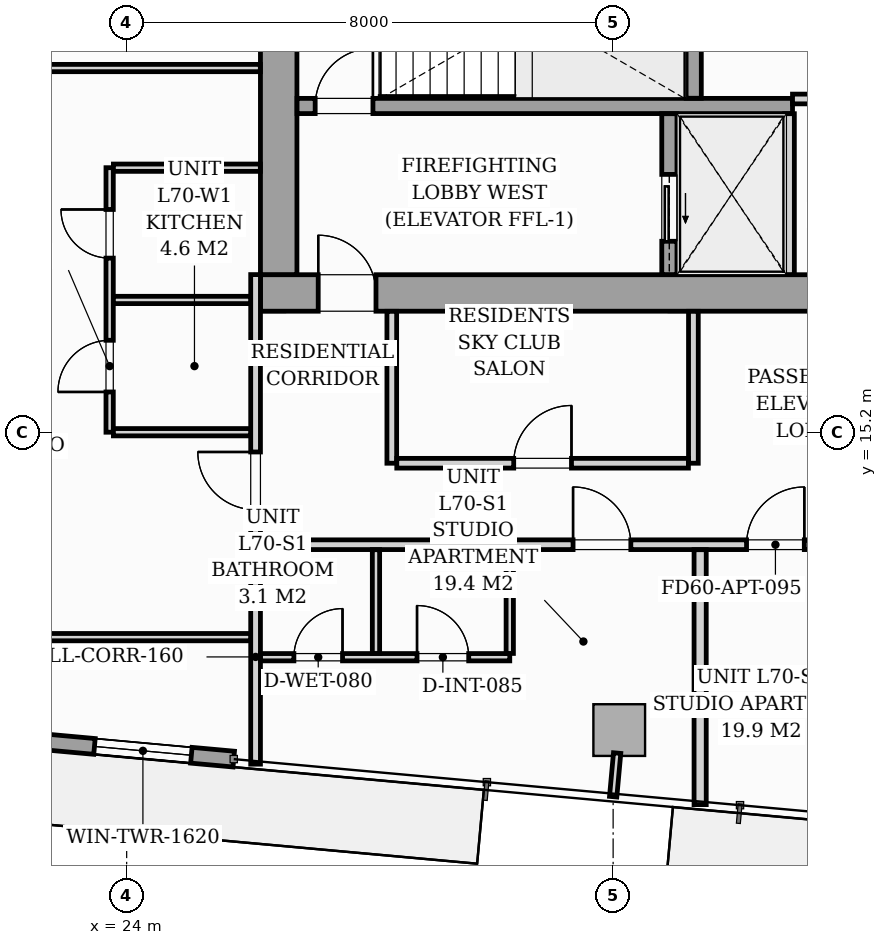
"""IFC4 building model, lengths in metres.
Left out: names, types, materials, properties, quantities, classifications, styles, units other than length and angle.
Written with IfcOpenShell. Run it as: python <this file> out.ifc"""

import sys

from ifc_helpers import new_model, si_unit, direction, frame, frame_2d, origin, origin_2d, place, context, subcontext, project, spatial, rectangle, i_section, extrude, source, transform, mapped, element, fill, save


model = new_model("IFC4")
c1 = context("Model", 3, precision=1e-05, world=origin(), true_north=direction((0.0, 1.0)))
c2 = subcontext(c1, "Body", "Model", "MODEL_VIEW")
j1 = project(units=[si_unit("LENGTHUNIT", "METRE"), si_unit("PLANEANGLEUNIT", "RADIAN")], contexts=[c1])
p1 = place(None, origin())
s1 = spatial("IfcSite", under=j1, at=p1, CompositionType="ELEMENT")
p2 = place(p1, origin())
s2 = spatial("IfcBuilding", under=s1, at=p2, CompositionType="ELEMENT")
p3 = place(p2, frame((0.0, 0.0, 243.0)))
s3 = spatial("IfcBuildingStorey", under=s2, at=p3, CompositionType="ELEMENT", Elevation=243.0)
m1 = source(origin(), c2, "Body", "SweptSolid", [
    extrude(i_section(OverallWidth=0.409, OverallDepth=0.425, WebThickness=0.033, FlangeThickness=0.052, FilletRadius=0.018, at=origin_2d()), origin(), (0.0, 0.0, 1.0), 3.296),
])
for number, where, z_axis, x_axis in (
    (1, (26.4, 17.4, 0.002), (0.0, 0.0, 1.0), (1.0, 0.0, 0.0)),
    (2, (33.12, 17.4, 0.002), (0.0, 0.0, 1.0), (1.0, 0.0, 0.0)),
):
    element("IfcColumn", number, at=place(p3, frame(where, z_axis=z_axis, x_axis=x_axis)), inside=s3, PredefinedType="PILASTER", context=c2, shape_type="MappedRepresentation", body=[
        mapped(m1, transform((0.0, 0.0, 0.0), scale=1.0)),
    ])
m2 = source(origin(), c2, "Body", "SweptSolid", [
    extrude(rectangle(XDim=0.85, YDim=0.85, at=origin_2d()), origin(), (0.0, 0.0, 1.0), 3.296),
])
p4 = place(p3, frame((32.1, 10.312, 0.002), z_axis=(0.0, 0.0, 1.0), x_axis=(0.995884398616, -0.090632580198, 0.0)))
e3 = element("IfcColumn", 3, at=p4, inside=s3, PredefinedType="COLUMN", context=c2, shape_type="MappedRepresentation", body=[
    mapped(m2, transform((0.0, 0.0, 0.0), scale=1.0)),
])
p5 = place(p3, frame((25.761, 9.834, 0.0), z_axis=(0.0, 0.0, 1.0), x_axis=(-0.995884584572, 0.090630536861, 0.0)))
e4 = element("IfcWall", 4, at=p5, inside=s3, PredefinedType="STANDARD", context=c2, shape_type="SweptSolid", body=[
    extrude(rectangle(XDim=14.63, YDim=0.26, at=frame_2d((7.315, 0.0))), origin(), (0.0, 0.0, 1.0), 3.04),
])
p6 = place(p5, frame((4.97, 0.0, 0.0)))
e5 = element("IfcOpeningElement", 5, at=p6, cuts=e4, PredefinedType="OPENING", context=c2, shape_type="SweptSolid", body=[
    extrude(rectangle(XDim=1.8, YDim=2.06, at=frame_2d((0.9, 1.03))), frame((0.0, 0.14, 0.0), z_axis=(0.0, -1.0, 0.0), x_axis=(1.0, 0.0, 0.0)), (0.0, 0.0, 1.0), 0.28),
])
p7 = place(p5, frame((0.7, 0.0, 0.65)))
e6 = element("IfcOpeningElement", 6, at=p7, cuts=e4, PredefinedType="OPENING", context=c2, shape_type="SweptSolid", body=[
    extrude(rectangle(XDim=1.6, YDim=1.5, at=frame_2d((0.8, 0.75))), frame((0.0, 0.14, 0.0), z_axis=(0.0, -1.0, 0.0), x_axis=(1.0, 0.0, 0.0)), (0.0, 0.0, 1.0), 0.28),
])
p8 = place(p3, frame((26.2, 17.5, 0.0), z_axis=(0.0, 0.0, 1.0), x_axis=(1.0, 0.0, 0.0)))
e7 = element("IfcWall", 7, at=p8, inside=s3, PredefinedType="SHEAR", context=c2, shape_type="SweptSolid", body=[
    extrude(rectangle(XDim=19.6, YDim=0.6, at=frame_2d((9.8, 0.0))), origin(), (0.0, 0.0, 1.0), 3.3),
])
p9 = place(p8, frame((0.95, 0.0, 0.0)))
e8 = element("IfcOpeningElement", 8, at=p9, cuts=e7, PredefinedType="OPENING", context=c2, shape_type="SweptSolid", body=[
    extrude(rectangle(XDim=0.95, YDim=2.06, at=frame_2d((0.475, 1.03))), frame((0.0, 0.31, 0.0), z_axis=(0.0, -1.0, 0.0), x_axis=(1.0, 0.0, 0.0)), (0.0, 0.0, 1.0), 0.62),
])
p10 = place(p8, frame((9.38, 0.0, 0.0)))
e9 = element("IfcOpeningElement", 9, at=p10, cuts=e7, PredefinedType="OPENING", context=c2, shape_type="SweptSolid", body=[
    extrude(rectangle(XDim=0.85, YDim=2.0, at=frame_2d((0.425, 1.0))), frame((0.0, 0.31, 0.0), z_axis=(0.0, -1.0, 0.0), x_axis=(1.0, 0.0, 0.0)), (0.0, 0.0, 1.0), 0.62),
])
p11 = place(p8, frame((17.55, 0.0, 0.0)))
e10 = element("IfcOpeningElement", 10, at=p11, cuts=e7, PredefinedType="OPENING", context=c2, shape_type="SweptSolid", body=[
    extrude(rectangle(XDim=0.95, YDim=2.06, at=frame_2d((0.475, 1.03))), frame((0.0, 0.31, 0.0), z_axis=(0.0, -1.0, 0.0), x_axis=(1.0, 0.0, 0.0)), (0.0, 0.0, 1.0), 0.62),
])
p12 = place(p3, frame((26.5, 17.802, 0.0), z_axis=(0.0, 0.0, 1.0), x_axis=(0.0, 1.0, 0.0)))
e11 = element("IfcWall", 11, at=p12, inside=s3, PredefinedType="SHEAR", context=c2, shape_type="SweptSolid", body=[
    extrude(rectangle(XDim=5.796, YDim=0.6, at=frame_2d((2.898, 0.0))), origin(), (0.0, 0.0, 1.0), 3.3),
])
p13 = place(p3, frame((26.802, 20.575, 0.0), z_axis=(0.0, 0.0, 1.0), x_axis=(1.0, 0.0, 0.0)))
e12 = element("IfcWall", 12, at=p13, inside=s3, PredefinedType="SOLIDWALL", context=c2, shape_type="SweptSolid", body=[
    extrude(rectangle(XDim=8.148, YDim=0.25, at=frame_2d((4.074, 0.0))), origin(), (0.0, 0.0, 1.0), 3.3),
])
p14 = place(p13, frame((0.298, 0.0, 0.0)))
e13 = element("IfcOpeningElement", 13, at=p14, cuts=e12, PredefinedType="OPENING", context=c2, shape_type="SweptSolid", body=[
    extrude(rectangle(XDim=0.95, YDim=2.06, at=frame_2d((0.475, 1.03))), frame((0.0, 0.135, 0.0), z_axis=(0.0, -1.0, 0.0), x_axis=(1.0, 0.0, 0.0)), (0.0, 0.0, 1.0), 0.27),
])
p15 = place(p3, frame((33.325, 20.702, 0.0), z_axis=(0.0, 0.0, 1.0), x_axis=(0.0, 1.0, 0.0)))
e14 = element("IfcWall", 14, at=p15, inside=s3, PredefinedType="SOLIDWALL", context=c2, shape_type="SweptSolid", body=[
    extrude(rectangle(XDim=2.896, YDim=0.25, at=frame_2d((1.448, 0.0))), origin(), (0.0, 0.0, 1.0), 3.3),
])
p16 = place(p3, frame((32.925, 17.802, 0.0), z_axis=(0.0, 0.0, 1.0), x_axis=(0.0, 1.0, 0.0)))
e15 = element("IfcWall", 15, at=p16, inside=s3, PredefinedType="SOLIDWALL", context=c2, shape_type="SweptSolid", body=[
    extrude(rectangle(XDim=2.646, YDim=0.25, at=frame_2d((1.323, 0.0))), origin(), (0.0, 0.0, 1.0), 3.3),
])
p17 = place(p16, frame((0.548, 0.0, 0.0)))
e16 = element("IfcOpeningElement", 16, at=p17, cuts=e15, PredefinedType="OPENING", context=c2, shape_type="SweptSolid", body=[
    extrude(rectangle(XDim=1.1, YDim=2.08, at=frame_2d((0.55, 1.04))), frame((0.0, 0.135, 0.0), z_axis=(0.0, -1.0, 0.0), x_axis=(1.0, 0.0, 0.0)), (0.0, 0.0, 1.0), 0.27),
])
p18 = place(p3, frame((34.9, 17.802, 0.0), z_axis=(0.0, 0.0, 1.0), x_axis=(0.0, 1.0, 0.0)))
e17 = element("IfcWall", 17, at=p18, inside=s3, PredefinedType="PARTITIONING", context=c2, shape_type="SweptSolid", body=[
    extrude(rectangle(XDim=2.646, YDim=0.16, at=frame_2d((1.323, 0.0))), origin(), (0.0, 0.0, 1.0), 3.04),
])
p19 = place(p3, frame((34.95, 20.69, 0.0), z_axis=(0.0, 0.0, 1.0), x_axis=(1.0, 0.0, 0.0)))
e18 = element("IfcWall", 18, at=p19, inside=s3, PredefinedType="PARTITIONING", context=c2, shape_type="SweptSolid", body=[
    extrude(rectangle(XDim=2.1, YDim=0.16, at=frame_2d((1.05, 0.0))), origin(), (0.0, 0.0, 1.0), 3.04),
])
p20 = place(p19, frame((0.65, 0.0, 0.0)))
e19 = element("IfcOpeningElement", 19, at=p20, cuts=e18, PredefinedType="OPENING", context=c2, shape_type="SweptSolid", body=[
    extrude(rectangle(XDim=0.8, YDim=2.05, at=frame_2d((0.4, 1.025))), frame((0.0, 0.09, 0.0), z_axis=(0.0, -1.0, 0.0), x_axis=(1.0, 0.0, 0.0)), (0.0, 0.0, 1.0), 0.18),
])
p21 = place(p3, frame((26.12, 13.36, 0.0), z_axis=(0.0, 0.0, 1.0), x_axis=(1.0, 0.0, 0.0)))
e20 = element("IfcWall", 20, at=p21, inside=s3, PredefinedType="PARTITIONING", context=c2, shape_type="SweptSolid", body=[
    extrude(rectangle(XDim=19.76, YDim=0.16, at=frame_2d((9.88, 0.0))), origin(), (0.0, 0.0, 1.0), 2.55),
])
p22 = place(p21, frame((5.221, 0.0, 0.0)))
e21 = element("IfcOpeningElement", 21, at=p22, cuts=e20, PredefinedType="OPENING", context=c2, shape_type="SweptSolid", body=[
    extrude(rectangle(XDim=0.95, YDim=2.06, at=frame_2d((0.475, 1.03))), frame((0.0, 0.09, 0.0), z_axis=(0.0, -1.0, 0.0), x_axis=(1.0, 0.0, 0.0)), (0.0, 0.0, 1.0), 0.18),
])
p23 = place(p21, frame((8.074, 0.0, 0.0)))
e22 = element("IfcOpeningElement", 22, at=p23, cuts=e20, PredefinedType="OPENING", context=c2, shape_type="SweptSolid", body=[
    extrude(rectangle(XDim=0.95, YDim=2.06, at=frame_2d((0.475, 1.03))), frame((0.0, 0.09, 0.0), z_axis=(0.0, -1.0, 0.0), x_axis=(1.0, 0.0, 0.0)), (0.0, 0.0, 1.0), 0.18),
])
p24 = place(p21, frame((18.17, 0.0, 0.0)))
e23 = element("IfcOpeningElement", 23, at=p24, cuts=e20, PredefinedType="OPENING", context=c2, shape_type="SweptSolid", body=[
    extrude(rectangle(XDim=0.95, YDim=2.06, at=frame_2d((0.475, 1.03))), frame((0.0, 0.09, 0.0), z_axis=(0.0, -1.0, 0.0), x_axis=(1.0, 0.0, 0.0)), (0.0, 0.0, 1.0), 0.18),
])
p25 = place(p3, frame((26.12, 9.751, 0.0), z_axis=(0.0, 0.0, 1.0), x_axis=(0.0, 1.0, 0.0)))
e24 = element("IfcWall", 24, at=p25, inside=s3, PredefinedType="PARTITIONING", context=c2, shape_type="SweptSolid", body=[
    extrude(rectangle(XDim=3.527, YDim=0.16, at=frame_2d((1.763, 0.0))), origin(), (0.0, 0.0, 1.0), 3.04),
])
p26 = place(p3, frame((26.12, 13.442, 0.0), z_axis=(0.0, 0.0, 1.0), x_axis=(0.0, 1.0, 0.0)))
e25 = element("IfcWall", 25, at=p26, inside=s3, PredefinedType="PARTITIONING", context=c2, shape_type="SweptSolid", body=[
    extrude(rectangle(XDim=4.36, YDim=0.16, at=frame_2d((2.18, 0.0))), origin(), (0.0, 0.0, 1.0), 3.04),
])
p27 = place(p26, frame((0.493, 0.0, 0.0)))
e26 = element("IfcOpeningElement", 26, at=p27, cuts=e25, PredefinedType="OPENING", context=c2, shape_type="SweptSolid", body=[
    extrude(rectangle(XDim=0.95, YDim=2.06, at=frame_2d((0.475, 1.03))), frame((0.0, 0.09, 0.0), z_axis=(0.0, -1.0, 0.0), x_axis=(1.0, 0.0, 0.0)), (0.0, 0.0, 1.0), 0.18),
])
p28 = place(p3, frame((26.202, 11.51, 0.0), z_axis=(0.0, 0.0, 1.0), x_axis=(1.0, 0.0, 0.0)))
e27 = element("IfcWall", 27, at=p28, inside=s3, PredefinedType="PARTITIONING", context=c2, shape_type="SweptSolid", body=[
    extrude(rectangle(XDim=4.098, YDim=0.12, at=frame_2d((2.049, 0.0))), origin(), (0.0, 0.0, 1.0), 2.55),
])
p29 = place(p28, frame((0.548, 0.0, 0.0)))
e28 = element("IfcOpeningElement", 28, at=p29, cuts=e27, PredefinedType="OPENING", context=c2, shape_type="SweptSolid", body=[
    extrude(rectangle(XDim=0.8, YDim=2.02, at=frame_2d((0.4, 1.01))), frame((0.0, 0.07, 0.0), z_axis=(0.0, -1.0, 0.0), x_axis=(1.0, 0.0, 0.0)), (0.0, 0.0, 1.0), 0.14),
])
p30 = place(p28, frame((2.573, 0.0, 0.0)))
e29 = element("IfcOpeningElement", 29, at=p30, cuts=e27, PredefinedType="OPENING", context=c2, shape_type="SweptSolid", body=[
    extrude(rectangle(XDim=0.85, YDim=2.05, at=frame_2d((0.425, 1.025))), frame((0.0, 0.07, 0.0), z_axis=(0.0, -1.0, 0.0), x_axis=(1.0, 0.0, 0.0)), (0.0, 0.0, 1.0), 0.14),
])
for number, where, z_axis, x_axis in (
    (30, (30.3, 11.572, 0.0), (0.0, 0.0, 1.0), (0.0, 1.0, 0.0)),
    (31, (28.1, 11.572, 0.0), (0.0, 0.0, 1.0), (0.0, 1.0, 0.0)),
):
    element("IfcWall", number, at=place(p3, frame(where, z_axis=z_axis, x_axis=x_axis)), inside=s3, PredefinedType="PARTITIONING", context=c2, shape_type="SweptSolid", body=[
        extrude(rectangle(XDim=1.706, YDim=0.12, at=frame_2d((0.853, 0.0))), origin(), (0.0, 0.0, 1.0), 3.04),
    ])
p31 = place(p3, frame((33.431, 9.086, 0.0), z_axis=(0.0, 0.0, 1.0), x_axis=(0.0, 1.0, 0.0)))
e32 = element("IfcWall", 32, at=p31, inside=s3, PredefinedType="PARTITIONING", context=c2, shape_type="SweptSolid", body=[
    extrude(rectangle(XDim=4.192, YDim=0.2, at=frame_2d((2.096, 0.0))), origin(), (0.0, 0.0, 1.0), 3.04),
])
p32 = place(p3, frame((23.72, 15.21, 0.0), z_axis=(0.0, 0.0, 1.0), x_axis=(0.0, 1.0, 0.0)))
e33 = element("IfcWall", 33, at=p32, inside=s3, PredefinedType="PARTITIONING", context=c2, shape_type="SweptSolid", body=[
    extrude(rectangle(XDim=4.35, YDim=0.12, at=frame_2d((2.175, 0.0))), origin(), (0.0, 0.0, 1.0), 3.04),
])
p33 = place(p32, frame((0.662, 0.0, 0.0)))
e34 = element("IfcOpeningElement", 34, at=p33, cuts=e33, PredefinedType="OPENING", context=c2, shape_type="SweptSolid", body=[
    extrude(rectangle(XDim=0.85, YDim=2.05, at=frame_2d((0.425, 1.025))), frame((0.0, 0.07, 0.0), z_axis=(0.0, -1.0, 0.0), x_axis=(1.0, 0.0, 0.0)), (0.0, 0.0, 1.0), 0.14),
])
p34 = place(p32, frame((2.863, 0.0, 0.0)))
e35 = element("IfcOpeningElement", 35, at=p34, cuts=e33, PredefinedType="OPENING", context=c2, shape_type="SweptSolid", body=[
    extrude(rectangle(XDim=0.8, YDim=2.02, at=frame_2d((0.4, 1.01))), frame((0.0, 0.07, 0.0), z_axis=(0.0, -1.0, 0.0), x_axis=(1.0, 0.0, 0.0)), (0.0, 0.0, 1.0), 0.14),
])
p35 = place(p3, frame((23.782, 17.385, 0.0), z_axis=(0.0, 0.0, 1.0), x_axis=(1.0, 0.0, 0.0)))
e36 = element("IfcWall", 36, at=p35, inside=s3, PredefinedType="PARTITIONING", context=c2, shape_type="SweptSolid", body=[
    extrude(rectangle(XDim=2.256, YDim=0.12, at=frame_2d((1.128, 0.0))), origin(), (0.0, 0.0, 1.0), 2.381),
])
p36 = place(p3, frame((23.782, 15.21, 0.0), z_axis=(0.0, 0.0, 1.0), x_axis=(1.0, 0.0, 0.0)))
e37 = element("IfcWall", 37, at=p36, inside=s3, PredefinedType="PARTITIONING", context=c2, shape_type="SweptSolid", body=[
    extrude(rectangle(XDim=2.256, YDim=0.12, at=frame_2d((1.128, 0.0))), origin(), (0.0, 0.0, 1.0), 3.04),
])
p37 = place(p3, frame((23.782, 19.56, 0.0), z_axis=(0.0, 0.0, 1.0), x_axis=(1.0, 0.0, 0.0)))
e38 = element("IfcWall", 38, at=p37, inside=s3, PredefinedType="PARTITIONING", context=c2, shape_type="SweptSolid", body=[
    extrude(rectangle(XDim=2.416, YDim=0.12, at=frame_2d((1.208, 0.0))), origin(), (0.0, 0.0, 1.0), 3.04),
])
p38 = place(p3, frame((11.516, 11.84, 0.0), z_axis=(0.0, 0.0, 1.0), x_axis=(1.0, 0.0, 0.0)))
e39 = element("IfcWall", 39, at=p38, inside=s3, PredefinedType="PARTITIONING", context=c2, shape_type="SweptSolid", body=[
    extrude(rectangle(XDim=14.522, YDim=0.12, at=frame_2d((7.261, 0.0))), origin(), (0.0, 0.0, 1.0), 2.482),
])
p39 = place(p38, frame((8.206, 0.0, 0.0)))
e40 = element("IfcOpeningElement", 40, at=p39, cuts=e39, PredefinedType="OPENING", context=c2, shape_type="SweptSolid", body=[
    extrude(rectangle(XDim=0.85, YDim=2.05, at=frame_2d((0.425, 1.025))), frame((0.0, 0.07, 0.0), z_axis=(0.0, -1.0, 0.0), x_axis=(1.0, 0.0, 0.0)), (0.0, 0.0, 1.0), 0.14),
])
p40 = place(p3, frame((9.675, 21.199, 0.0), z_axis=(0.0, 0.0, 1.0), x_axis=(1.0, 0.0, 0.0)))
e41 = element("IfcWall", 41, at=p40, inside=s3, PredefinedType="PARTITIONING", context=c2, shape_type="SweptSolid", body=[
    extrude(rectangle(XDim=16.523, YDim=0.12, at=frame_2d((8.262, 0.0))), origin(), (0.0, 0.0, 1.0), 3.04),
])
p41 = place(p40, frame((10.047, 0.0, 0.0)))
e42 = element("IfcOpeningElement", 42, at=p41, cuts=e41, PredefinedType="OPENING", context=c2, shape_type="SweptSolid", body=[
    extrude(rectangle(XDim=0.85, YDim=2.05, at=frame_2d((0.425, 1.025))), frame((0.0, 0.07, 0.0), z_axis=(0.0, -1.0, 0.0), x_axis=(1.0, 0.0, 0.0)), (0.0, 0.0, 1.0), 0.14),
])
for number, where, z_axis, x_axis in (
    (43, (28.36, 14.7, 0.0), (0.0, 0.0, 1.0), (0.0, 1.0, 0.0)),
    (44, (33.32, 14.7, 0.0), (0.0, 0.0, 1.0), (0.0, 1.0, 0.0)),
):
    element("IfcWall", number, at=place(p3, frame(where, z_axis=z_axis, x_axis=x_axis)), inside=s3, PredefinedType="PARTITIONING", context=c2, shape_type="SweptSolid", body=[
        extrude(rectangle(XDim=2.498, YDim=0.16, at=frame_2d((1.249, 0.0))), origin(), (0.0, 0.0, 1.0), 3.04),
    ])
p42 = place(p3, frame((28.442, 14.7, 0.0), z_axis=(0.0, 0.0, 1.0), x_axis=(1.0, 0.0, 0.0)))
e45 = element("IfcWall", 45, at=p42, inside=s3, PredefinedType="PARTITIONING", context=c2, shape_type="SweptSolid", body=[
    extrude(rectangle(XDim=4.796, YDim=0.16, at=frame_2d((2.398, 0.0))), origin(), (0.0, 0.0, 1.0), 2.55),
])
p43 = place(p42, frame((1.923, 0.0, 0.0)))
e46 = element("IfcOpeningElement", 46, at=p43, cuts=e45, PredefinedType="OPENING", context=c2, shape_type="SweptSolid", body=[
    extrude(rectangle(XDim=0.95, YDim=2.06, at=frame_2d((0.475, 1.03))), frame((0.0, 0.09, 0.0), z_axis=(0.0, -1.0, 0.0), x_axis=(1.0, 0.0, 0.0)), (0.0, 0.0, 1.0), 0.18),
])
p44 = place(p3, frame((32.066, 9.933, 0.0), z_axis=(0.0, 0.0, 1.0), x_axis=(-0.090872036342, -0.995862577373, 0.0)))
e47 = element("IfcWall", 47, at=p44, inside=s3, PredefinedType="PARTITIONING", context=c2, shape_type="SweptSolid", body=[
    extrude(rectangle(XDim=0.72, YDim=0.12, at=frame_2d((0.36, 0.0))), origin(), (0.0, 0.0, 1.0), 3.04),
])
m3 = source(origin(), c2, "Body", "SweptSolid", [
    extrude(rectangle(XDim=1.6, YDim=1.5, at=frame_2d((0.8, 0.75))), frame((0.0, 0.03, 0.0), z_axis=(0.0, -1.0, 0.0), x_axis=(1.0, 0.0, 0.0)), (0.0, 0.0, 1.0), 0.06),
])
p45 = place(p7, origin())
e48 = element("IfcWindow", 48, at=p45, inside=s3, PartitioningType="SINGLE_PANEL", PredefinedType="WINDOW", context=c2, shape_type="MappedRepresentation", body=[
    mapped(m3, transform((0.0, 0.0, 0.0), scale=1.0)),
])
fill(e6, e48)
m4 = source(origin(), c2, "Body", "SweptSolid", [
    extrude(rectangle(XDim=0.95, YDim=2.06, at=frame_2d((0.475, 1.03))), frame((0.0, 0.025, 0.0), z_axis=(0.0, -1.0, 0.0), x_axis=(1.0, 0.0, 0.0)), (0.0, 0.0, 1.0), 0.05),
])
p46 = place(p9, origin())
e49 = element("IfcDoor", 49, at=p46, inside=s3, OperationType="SINGLE_SWING_LEFT", PredefinedType="DOOR", context=c2, shape_type="MappedRepresentation", body=[
    mapped(m4, transform((0.0, 0.0, 0.0), scale=1.0)),
])
fill(e8, e49)
p47 = place(p14, origin())
e50 = element("IfcDoor", 50, at=p47, inside=s3, OperationType="SINGLE_SWING_RIGHT", PredefinedType="DOOR", context=c2, shape_type="MappedRepresentation", body=[
    mapped(m4, transform((0.0, 0.0, 0.0), scale=1.0)),
])
fill(e13, e50)
m5 = source(origin(), c2, "Body", "SweptSolid", [
    extrude(rectangle(XDim=1.1, YDim=2.08, at=frame_2d((0.55, 1.04))), frame((0.0, 0.025, 0.0), z_axis=(0.0, -1.0, 0.0), x_axis=(1.0, 0.0, 0.0)), (0.0, 0.0, 1.0), 0.05),
])
p48 = place(p17, origin())
e51 = element("IfcDoor", 51, at=p48, inside=s3, OperationType="SLIDING_TO_LEFT", PredefinedType="DOOR", context=c2, shape_type="MappedRepresentation", body=[
    mapped(m5, transform((0.0, 0.0, 0.0), scale=1.0)),
])
fill(e16, e51)
m6 = source(origin(), c2, "Body", "SweptSolid", [
    extrude(rectangle(XDim=0.95, YDim=2.06, at=frame_2d((0.475, 1.03))), frame((0.0, 0.025, 0.0), z_axis=(0.0, -1.0, 0.0), x_axis=(1.0, 0.0, 0.0)), (0.0, 0.0, 1.0), 0.05),
])
p49 = place(p22, origin())
e52 = element("IfcDoor", 52, at=p49, inside=s3, OperationType="SINGLE_SWING_LEFT", PredefinedType="DOOR", context=c2, shape_type="MappedRepresentation", body=[
    mapped(m6, transform((0.0, 0.0, 0.0), scale=1.0)),
])
fill(e21, e52)
m7 = source(origin(), c2, "Body", "SweptSolid", [
    extrude(rectangle(XDim=0.8, YDim=2.02, at=frame_2d((0.4, 1.01))), frame((0.0, 0.025, 0.0), z_axis=(0.0, -1.0, 0.0), x_axis=(1.0, 0.0, 0.0)), (0.0, 0.0, 1.0), 0.05),
])
p50 = place(p29, origin())
e53 = element("IfcDoor", 53, at=p50, inside=s3, OperationType="SINGLE_SWING_RIGHT", PredefinedType="DOOR", context=c2, shape_type="MappedRepresentation", body=[
    mapped(m7, transform((0.0, 0.0, 0.0), scale=1.0)),
])
fill(e28, e53)
m8 = source(origin(), c2, "Body", "SweptSolid", [
    extrude(rectangle(XDim=0.85, YDim=2.05, at=frame_2d((0.425, 1.025))), frame((0.0, 0.025, 0.0), z_axis=(0.0, -1.0, 0.0), x_axis=(1.0, 0.0, 0.0)), (0.0, 0.0, 1.0), 0.05),
])
p51 = place(p30, origin())
e54 = element("IfcDoor", 54, at=p51, inside=s3, OperationType="SINGLE_SWING_LEFT", PredefinedType="DOOR", context=c2, shape_type="MappedRepresentation", body=[
    mapped(m8, transform((0.0, 0.0, 0.0), scale=1.0)),
])
fill(e29, e54)
p52 = place(p23, origin())
e55 = element("IfcDoor", 55, at=p52, inside=s3, OperationType="SINGLE_SWING_RIGHT", PredefinedType="DOOR", context=c2, shape_type="MappedRepresentation", body=[
    mapped(m6, transform((0.0, 0.0, 0.0), scale=1.0)),
])
fill(e22, e55)
p53 = place(p27, origin())
e56 = element("IfcDoor", 56, at=p53, inside=s3, OperationType="SINGLE_SWING_RIGHT", PredefinedType="DOOR", context=c2, shape_type="MappedRepresentation", body=[
    mapped(m6, transform((0.0, 0.0, 0.0), scale=1.0)),
])
fill(e26, e56)
p54 = place(p33, origin())
e57 = element("IfcDoor", 57, at=p54, inside=s3, OperationType="SINGLE_SWING_LEFT", PredefinedType="DOOR", context=c2, shape_type="MappedRepresentation", body=[
    mapped(m8, transform((0.0, 0.0, 0.0), scale=1.0)),
])
fill(e34, e57)
p55 = place(p34, origin())
e58 = element("IfcDoor", 58, at=p55, inside=s3, OperationType="SINGLE_SWING_RIGHT", PredefinedType="DOOR", context=c2, shape_type="MappedRepresentation", body=[
    mapped(m7, transform((0.0, 0.0, 0.0), scale=1.0)),
])
fill(e35, e58)
p56 = place(p43, origin())
e59 = element("IfcDoor", 59, at=p56, inside=s3, OperationType="SINGLE_SWING_RIGHT", PredefinedType="DOOR", context=c2, shape_type="MappedRepresentation", body=[
    mapped(m6, transform((0.0, 0.0, 0.0), scale=1.0)),
])
fill(e46, e59)
save(model, sys.argv[1])
